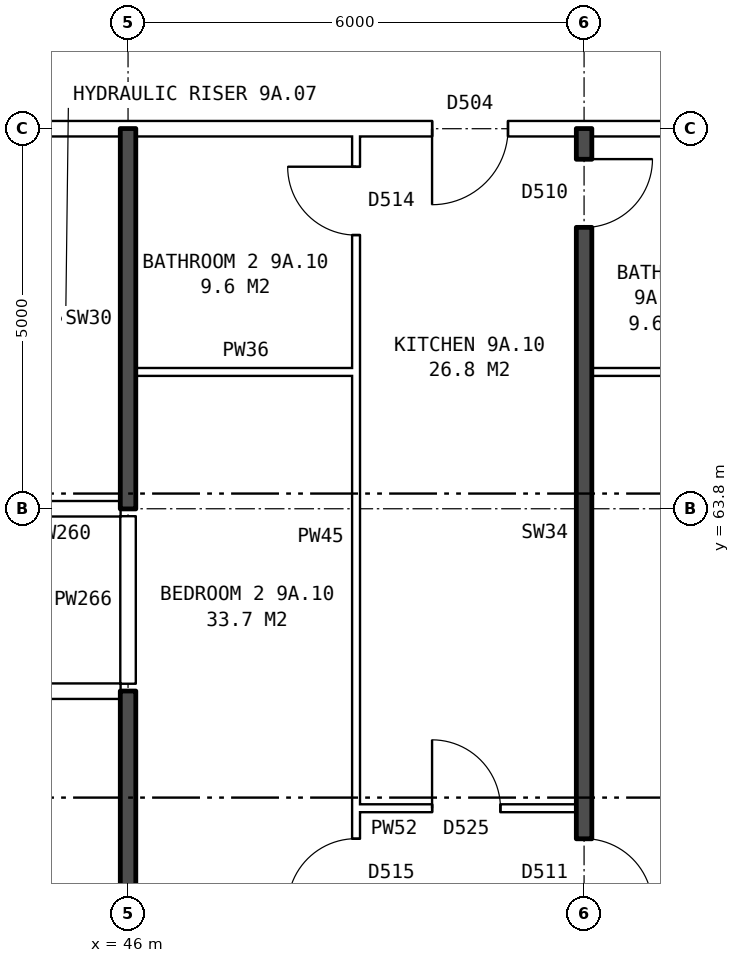
"""IFC4 building model, lengths in metres.
Left out: names, types, materials, properties, quantities, classifications, styles, units other than length and angle.
Written with IfcOpenShell. Run it as: python <this file> out.ifc"""

import sys

from ifc_helpers import new_model, si_unit, direction, frame, frame_2d, origin, place, context, subcontext, project, spatial, rectangle, extrude, element, fill, save


model = new_model("IFC4")
c1 = context("Model", 3, precision=1e-05, world=origin(), true_north=direction((0.0, 1.0)))
c2 = subcontext(c1, "Body", "Model", "MODEL_VIEW")
j1 = project(units=[si_unit("LENGTHUNIT", "METRE"), si_unit("PLANEANGLEUNIT", "RADIAN")], contexts=[c1])
p1 = place(None, origin())
s1 = spatial("IfcSite", under=j1, at=p1, CompositionType="ELEMENT")
p2 = place(p1, origin())
s2 = spatial("IfcBuilding", under=s1, at=p2, CompositionType="ELEMENT")
p3 = place(p2, frame((0.0, 0.0, 35.0)))
s3 = spatial("IfcBuildingStorey", under=s2, at=p3, CompositionType="ELEMENT", Elevation=35.0)
p4 = place(p3, frame((49.0, 59.86, 0.0), z_axis=(0.0, 0.0, 1.0), x_axis=(1.0, 0.0, 0.0)))
e1 = element("IfcWall", 1, at=p4, inside=s3, PredefinedType="PARTITIONING", context=c2, shape_type="SweptSolid", body=[
    extrude(rectangle(XDim=2.9, YDim=0.1, at=frame_2d((1.45, 0.0))), origin(), (0.0, 0.0, 1.0), 2.85),
])
p5 = place(p4, frame((1.0, 0.0, 0.0)))
e2 = element("IfcOpeningElement", 2, at=p5, cuts=e1, PredefinedType="OPENING", context=c2, shape_type="SweptSolid", body=[
    extrude(rectangle(XDim=0.9, YDim=2.1, at=frame_2d((0.45, 1.05))), frame((0.0, 0.06, 0.0), z_axis=(0.0, -1.0, 0.0), x_axis=(1.0, 0.0, 0.0)), (0.0, 0.0, 1.0), 0.12),
])
p6 = place(p3, frame((20.11, 61.4, 0.0), z_axis=(0.0, 0.0, 1.0), x_axis=(1.0, 0.0, 0.0)))
e3 = element("IfcWall", 3, at=p6, inside=s3, PredefinedType="PARTITIONING", context=c2, shape_type="SweptSolid", body=[
    extrude(rectangle(XDim=25.79, YDim=0.2, at=frame_2d((12.895, 0.0))), origin(), (0.0, 0.0, 1.0), 2.85),
])
p7 = place(p6, frame((23.34, 0.0, 0.0)))
e4 = element("IfcOpeningElement", 4, at=p7, cuts=e3, PredefinedType="OPENING", context=c2, shape_type="SweptSolid", body=[
    extrude(rectangle(XDim=1.0, YDim=2.1, at=frame_2d((0.5, 1.05))), frame((0.0, 0.11, 0.0), z_axis=(0.0, -1.0, 0.0), x_axis=(1.0, 0.0, 0.0)), (0.0, 0.0, 1.0), 0.22),
])
p8 = place(p6, frame((17.39, 0.0, 0.0)))
e5 = element("IfcOpeningElement", 5, at=p8, cuts=e3, PredefinedType="OPENING", context=c2, shape_type="SweptSolid", body=[
    extrude(rectangle(XDim=1.0, YDim=2.1, at=frame_2d((0.5, 1.05))), frame((0.0, 0.11, 0.0), z_axis=(0.0, -1.0, 0.0), x_axis=(1.0, 0.0, 0.0)), (0.0, 0.0, 1.0), 0.22),
])
p9 = place(p6, frame((11.39, 0.0, 0.0)))
e6 = element("IfcOpeningElement", 6, at=p9, cuts=e3, PredefinedType="OPENING", context=c2, shape_type="SweptSolid", body=[
    extrude(rectangle(XDim=1.0, YDim=2.1, at=frame_2d((0.5, 1.05))), frame((0.0, 0.11, 0.0), z_axis=(0.0, -1.0, 0.0), x_axis=(1.0, 0.0, 0.0)), (0.0, 0.0, 1.0), 0.22),
])
p10 = place(p6, frame((2.245, 0.0, 0.0)))
e7 = element("IfcOpeningElement", 7, at=p10, cuts=e3, PredefinedType="OPENING", context=c2, shape_type="SweptSolid", body=[
    extrude(rectangle(XDim=1.0, YDim=2.1, at=frame_2d((0.5, 1.05))), frame((0.0, 0.11, 0.0), z_axis=(0.0, -1.0, 0.0), x_axis=(1.0, 0.0, 0.0)), (0.0, 0.0, 1.0), 0.22),
])
p11 = place(p3, frame((44.36, 63.8, 0.0), z_axis=(0.0, 0.0, 1.0), x_axis=(1.0, 0.0, 0.0)))
e8 = element("IfcWall", 8, at=p11, inside=s3, PredefinedType="PARTITIONING", context=c2, shape_type="SweptSolid", body=[
    extrude(rectangle(XDim=1.54, YDim=0.2, at=frame_2d((0.77, 0.0))), origin(), (0.0, 0.0, 1.0), 2.85),
])
p12 = place(p3, frame((46.1, 65.6, 0.0), z_axis=(0.0, 0.0, 1.0), x_axis=(1.0, 0.0, 0.0)))
e9 = element("IfcWall", 9, at=p12, inside=s3, PredefinedType="PARTITIONING", context=c2, shape_type="SweptSolid", body=[
    extrude(rectangle(XDim=2.9, YDim=0.1, at=frame_2d((1.45, 0.0))), origin(), (0.0, 0.0, 1.0), 2.85),
])
p13 = place(p3, frame((52.1, 65.6, 0.0), z_axis=(0.0, 0.0, 1.0), x_axis=(1.0, 0.0, 0.0)))
e10 = element("IfcWall", 10, at=p13, inside=s3, PredefinedType="PARTITIONING", context=c2, shape_type="SweptSolid", body=[
    extrude(rectangle(XDim=2.8, YDim=0.1, at=frame_2d((1.4, 0.0))), origin(), (0.0, 0.0, 1.0), 2.85),
])
p14 = place(p3, frame((44.36, 68.8, 0.0), z_axis=(0.0, 0.0, 1.0), x_axis=(1.0, 0.0, 0.0)))
e11 = element("IfcWall", 11, at=p14, inside=s3, PredefinedType="PARTITIONING", context=c2, shape_type="SweptSolid", body=[
    extrude(rectangle(XDim=19.28, YDim=0.2, at=frame_2d((9.64, 0.0))), origin(), (0.0, 0.0, 1.0), 2.85),
])
p15 = place(p14, frame((14.64, 0.0, 0.0)))
e12 = element("IfcOpeningElement", 12, at=p15, cuts=e11, PredefinedType="OPENING", context=c2, shape_type="SweptSolid", body=[
    extrude(rectangle(XDim=1.0, YDim=2.1, at=frame_2d((0.5, 1.05))), frame((0.0, 0.11, 0.0), z_axis=(0.0, -1.0, 0.0), x_axis=(1.0, 0.0, 0.0)), (0.0, 0.0, 1.0), 0.22),
])
p16 = place(p14, frame((5.64, 0.0, 0.0)))
e13 = element("IfcOpeningElement", 13, at=p16, cuts=e11, PredefinedType="OPENING", context=c2, shape_type="SweptSolid", body=[
    extrude(rectangle(XDim=1.0, YDim=2.1, at=frame_2d((0.5, 1.05))), frame((0.0, 0.11, 0.0), z_axis=(0.0, -1.0, 0.0), x_axis=(1.0, 0.0, 0.0)), (0.0, 0.0, 1.0), 0.22),
])
p17 = place(p3, frame((46.0, 54.36, 0.0), z_axis=(0.0, 0.0, 1.0), x_axis=(0.0, 1.0, 0.0)))
e14 = element("IfcWall", 14, at=p17, inside=s3, PredefinedType="SOLIDWALL", context=c2, shape_type="SweptSolid", body=[
    extrude(rectangle(XDim=7.04, YDim=0.2, at=frame_2d((3.52, 0.0))), origin(), (0.0, 0.0, 1.0), 2.85),
])
p18 = place(p3, frame((46.0, 61.5, 0.0), z_axis=(0.0, 0.0, 1.0), x_axis=(0.0, 1.0, 0.0)))
e15 = element("IfcWall", 15, at=p18, inside=s3, PredefinedType="PARTITIONING", context=c2, shape_type="SweptSolid", body=[
    extrude(rectangle(XDim=2.2, YDim=0.2, at=frame_2d((1.1, 0.0))), origin(), (0.0, 0.0, 1.0), 2.85),
])
p19 = place(p3, frame((46.0, 63.8, 0.0), z_axis=(0.0, 0.0, 1.0), x_axis=(0.0, 1.0, 0.0)))
e16 = element("IfcWall", 16, at=p19, inside=s3, PredefinedType="SOLIDWALL", context=c2, shape_type="SweptSolid", body=[
    extrude(rectangle(XDim=5.0, YDim=0.2, at=frame_2d((2.5, 0.0))), origin(), (0.0, 0.0, 1.0), 2.85),
])
p20 = place(p3, frame((49.0, 54.36, 0.0), z_axis=(0.0, 0.0, 1.0), x_axis=(0.0, 1.0, 0.0)))
e17 = element("IfcWall", 17, at=p20, inside=s3, PredefinedType="PARTITIONING", context=c2, shape_type="SweptSolid", body=[
    extrude(rectangle(XDim=14.34, YDim=0.1, at=frame_2d((7.17, 0.0))), origin(), (0.0, 0.0, 1.0), 2.85),
])
p21 = place(p20, frame((4.2, 0.0, 0.0)))
e18 = element("IfcOpeningElement", 18, at=p21, cuts=e17, PredefinedType="OPENING", context=c2, shape_type="SweptSolid", body=[
    extrude(rectangle(XDim=0.9, YDim=2.1, at=frame_2d((0.45, 1.05))), frame((0.0, 0.06, 0.0), z_axis=(0.0, -1.0, 0.0), x_axis=(1.0, 0.0, 0.0)), (0.0, 0.0, 1.0), 0.12),
])
p22 = place(p20, frame((13.04, 0.0, 0.0)))
e19 = element("IfcOpeningElement", 19, at=p22, cuts=e17, PredefinedType="OPENING", context=c2, shape_type="SweptSolid", body=[
    extrude(rectangle(XDim=0.9, YDim=2.1, at=frame_2d((0.45, 1.05))), frame((0.0, 0.06, 0.0), z_axis=(0.0, -1.0, 0.0), x_axis=(1.0, 0.0, 0.0)), (0.0, 0.0, 1.0), 0.12),
])
p23 = place(p3, frame((52.0, 54.36, 0.0), z_axis=(0.0, 0.0, 1.0), x_axis=(0.0, 1.0, 0.0)))
e20 = element("IfcWall", 20, at=p23, inside=s3, PredefinedType="SOLIDWALL", context=c2, shape_type="SweptSolid", body=[
    extrude(rectangle(XDim=14.44, YDim=0.2, at=frame_2d((7.22, 0.0))), origin(), (0.0, 0.0, 1.0), 2.85),
])
p24 = place(p23, frame((4.2, 0.0, 0.0)))
e21 = element("IfcOpeningElement", 21, at=p24, cuts=e20, PredefinedType="OPENING", context=c2, shape_type="SweptSolid", body=[
    extrude(rectangle(XDim=0.9, YDim=2.1, at=frame_2d((0.45, 1.05))), frame((0.0, 0.11, 0.0), z_axis=(0.0, -1.0, 0.0), x_axis=(1.0, 0.0, 0.0)), (0.0, 0.0, 1.0), 0.22),
])
p25 = place(p23, frame((13.14, 0.0, 0.0)))
e22 = element("IfcOpeningElement", 22, at=p25, cuts=e20, PredefinedType="OPENING", context=c2, shape_type="SweptSolid", body=[
    extrude(rectangle(XDim=0.9, YDim=2.1, at=frame_2d((0.45, 1.05))), frame((0.0, 0.11, 0.0), z_axis=(0.0, -1.0, 0.0), x_axis=(1.0, 0.0, 0.0)), (0.0, 0.0, 1.0), 0.22),
])
p26 = place(p24, frame((0.9, 0.0, 0.0), z_axis=(0.0, 0.0, 1.0), x_axis=(-1.0, 0.0, 0.0)))
e23 = element("IfcDoor", 23, at=p26, inside=s3, OperationType="SINGLE_SWING_RIGHT", PredefinedType="DOOR", context=c2, shape_type="SweptSolid", body=[
    extrude(rectangle(XDim=0.9, YDim=2.1, at=frame_2d((0.45, 1.05))), frame((0.0, 0.025, 0.0), z_axis=(0.0, -1.0, 0.0), x_axis=(1.0, 0.0, 0.0)), (0.0, 0.0, 1.0), 0.05),
])
fill(e21, e23)
p27 = place(p21, origin())
e24 = element("IfcDoor", 24, at=p27, inside=s3, OperationType="SINGLE_SWING_LEFT", PredefinedType="DOOR", context=c2, shape_type="SweptSolid", body=[
    extrude(rectangle(XDim=0.9, YDim=2.1, at=frame_2d((0.45, 1.05))), frame((0.0, 0.025, 0.0), z_axis=(0.0, -1.0, 0.0), x_axis=(1.0, 0.0, 0.0)), (0.0, 0.0, 1.0), 0.05),
])
fill(e18, e24)
p28 = place(p16, frame((1.0, 0.0, 0.0), z_axis=(0.0, 0.0, 1.0), x_axis=(-1.0, 0.0, 0.0)))
e25 = element("IfcDoor", 25, at=p28, inside=s3, OperationType="SINGLE_SWING_RIGHT", PredefinedType="DOOR", context=c2, shape_type="SweptSolid", body=[
    extrude(rectangle(XDim=1.0, YDim=2.1, at=frame_2d((0.5, 1.05))), frame((0.0, 0.025, 0.0), z_axis=(0.0, -1.0, 0.0), x_axis=(1.0, 0.0, 0.0)), (0.0, 0.0, 1.0), 0.05),
])
fill(e13, e25)
p29 = place(p5, origin())
e26 = element("IfcDoor", 26, at=p29, inside=s3, OperationType="SINGLE_SWING_LEFT", PredefinedType="DOOR", context=c2, shape_type="SweptSolid", body=[
    extrude(rectangle(XDim=0.9, YDim=2.1, at=frame_2d((0.45, 1.05))), frame((0.0, 0.025, 0.0), z_axis=(0.0, -1.0, 0.0), x_axis=(1.0, 0.0, 0.0)), (0.0, 0.0, 1.0), 0.05),
])
fill(e2, e26)
p30 = place(p25, frame((0.9, 0.0, 0.0), z_axis=(0.0, 0.0, 1.0), x_axis=(-1.0, 0.0, 0.0)))
e27 = element("IfcDoor", 27, at=p30, inside=s3, OperationType="SINGLE_SWING_LEFT", PredefinedType="DOOR", context=c2, shape_type="SweptSolid", body=[
    extrude(rectangle(XDim=0.9, YDim=2.1, at=frame_2d((0.45, 1.05))), frame((0.0, 0.025, 0.0), z_axis=(0.0, -1.0, 0.0), x_axis=(1.0, 0.0, 0.0)), (0.0, 0.0, 1.0), 0.05),
])
fill(e22, e27)
p31 = place(p22, origin())
e28 = element("IfcDoor", 28, at=p31, inside=s3, OperationType="SINGLE_SWING_RIGHT", PredefinedType="DOOR", context=c2, shape_type="SweptSolid", body=[
    extrude(rectangle(XDim=0.9, YDim=2.1, at=frame_2d((0.45, 1.05))), frame((0.0, 0.025, 0.0), z_axis=(0.0, -1.0, 0.0), x_axis=(1.0, 0.0, 0.0)), (0.0, 0.0, 1.0), 0.05),
])
fill(e19, e28)
save(model, sys.argv[1])
